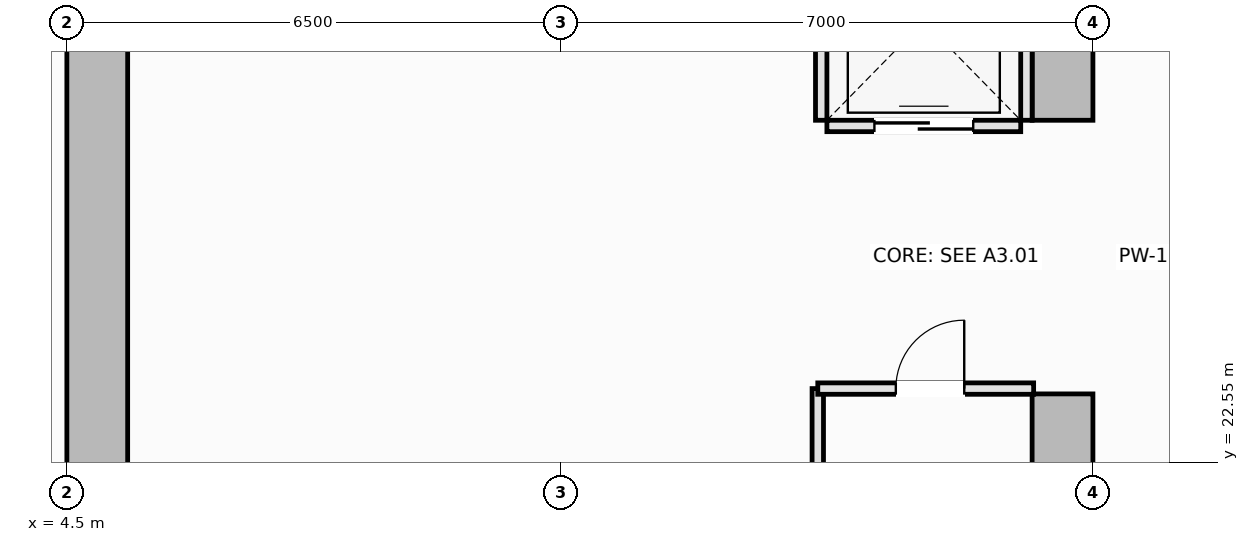
"""IFC4 building model, lengths in metres.
Left out: names, types, materials, properties, quantities, classifications, styles, units other than length and angle.
Written with IfcOpenShell. Run it as: python <this file> out.ifc"""

import sys

from ifc_helpers import new_model, si_unit, direction, frame, frame_2d, origin, place, context, subcontext, project, spatial, rectangle, extrude, element, fill, save


model = new_model("IFC4")
c1 = context("Model", 3, precision=1e-05, world=origin(), true_north=direction((0.0, 1.0)))
c2 = subcontext(c1, "Body", "Model", "MODEL_VIEW")
j1 = project(units=[si_unit("LENGTHUNIT", "METRE"), si_unit("PLANEANGLEUNIT", "RADIAN")], contexts=[c1])
p1 = place(None, origin())
s1 = spatial("IfcSite", under=j1, at=p1, CompositionType="ELEMENT")
p2 = place(p1, origin())
s2 = spatial("IfcBuilding", under=s1, at=p2, CompositionType="ELEMENT")
p3 = place(p2, frame((0.0, 0.0, -13.2)))
s3 = spatial("IfcBuildingStorey", under=s2, at=p3, CompositionType="ELEMENT", Elevation=-13.2)
p4 = place(p3, frame((4.9, 14.8, 0.0), z_axis=(0.0, 0.0, 1.0), x_axis=(0.0, 1.0, 0.0)))
e1 = element("IfcWall", 1, at=p4, inside=s3, PredefinedType="SHEAR", context=c2, shape_type="SweptSolid", body=[
    extrude(rectangle(XDim=20.9, YDim=0.8, at=frame_2d((10.45, 0.0))), origin(), (0.0, 0.0, 1.0), 4.2),
])
p5 = place(p3, frame((17.6, 14.8, 0.0), z_axis=(0.0, 0.0, 1.0), x_axis=(0.0, 1.0, 0.0)))
e2 = element("IfcWall", 2, at=p5, inside=s3, PredefinedType="SHEAR", context=c2, shape_type="SweptSolid", body=[
    extrude(rectangle(XDim=8.65, YDim=0.8, at=frame_2d((4.325, 0.0))), origin(), (0.0, 0.0, 1.0), 4.2),
])
p6 = place(p5, frame((4.1, 0.0, 0.0)))
e3 = element("IfcOpeningElement", 3, at=p6, cuts=e2, PredefinedType="OPENING", context=c2, shape_type="SweptSolid", body=[
    extrude(rectangle(XDim=1.1, YDim=2.15, at=frame_2d((0.55, 1.075))), frame((0.0, 0.41, 0.0), z_axis=(0.0, -1.0, 0.0), x_axis=(1.0, 0.0, 0.0)), (0.0, 0.0, 1.0), 0.82),
])
p7 = place(p3, frame((17.6, 27.05, 0.0), z_axis=(0.0, 0.0, 1.0), x_axis=(0.0, 1.0, 0.0)))
e4 = element("IfcWall", 4, at=p7, inside=s3, PredefinedType="SHEAR", context=c2, shape_type="SweptSolid", body=[
    extrude(rectangle(XDim=8.65, YDim=0.8, at=frame_2d((4.325, 0.0))), origin(), (0.0, 0.0, 1.0), 4.2),
])
p8 = place(p7, frame((3.45, 0.0, 0.0)))
e5 = element("IfcOpeningElement", 5, at=p8, cuts=e4, PredefinedType="OPENING", context=c2, shape_type="SweptSolid", body=[
    extrude(rectangle(XDim=1.1, YDim=2.15, at=frame_2d((0.55, 1.075))), frame((0.0, 0.41, 0.0), z_axis=(0.0, -1.0, 0.0), x_axis=(1.0, 0.0, 0.0)), (0.0, 0.0, 1.0), 0.82),
])
p9 = place(p3, frame((14.5, 26.975, 0.0), z_axis=(0.0, 0.0, 1.0), x_axis=(1.0, 0.0, 0.0)))
e6 = element("IfcWall", 6, at=p9, inside=s3, PredefinedType="PARTITIONING", context=c2, shape_type="SweptSolid", body=[
    extrude(rectangle(XDim=2.55, YDim=0.15, at=frame_2d((1.275, 0.0))), origin(), (0.0, 0.0, 1.0), 4.0),
])
p10 = place(p9, frame((0.625, 0.0, 0.0)))
e7 = element("IfcOpeningElement", 7, at=p10, cuts=e6, PredefinedType="OPENING", context=c2, shape_type="SweptSolid", body=[
    extrude(rectangle(XDim=1.3, YDim=2.2, at=frame_2d((0.65, 1.1))), frame((0.0, 0.085, 0.0), z_axis=(0.0, -1.0, 0.0), x_axis=(1.0, 0.0, 0.0)), (0.0, 0.0, 1.0), 0.17),
])
for number, where, z_axis, x_axis in (
    (8, (14.425, 27.05, 0.0), (0.0, 0.0, 1.0), (0.0, 1.0, 0.0)),
    (9, (17.125, 27.05, 0.0), (0.0, 0.0, 1.0), (0.0, 1.0, 0.0)),
):
    element("IfcWall", number, at=place(p3, frame(where, z_axis=z_axis, x_axis=x_axis)), inside=s3, PredefinedType="PARTITIONING", context=c2, shape_type="SweptSolid", body=[
        extrude(rectangle(XDim=2.6, YDim=0.15, at=frame_2d((1.3, 0.0))), origin(), (0.0, 0.0, 1.0), 4.0),
    ])
p11 = place(p3, frame((14.38, 20.85, 0.0), z_axis=(0.0, 0.0, 1.0), x_axis=(0.0, 1.0, 0.0)))
e10 = element("IfcWall", 10, at=p11, inside=s3, PredefinedType="PARTITIONING", context=c2, shape_type="SweptSolid", body=[
    extrude(rectangle(XDim=2.67, YDim=0.15, at=frame_2d((1.335, 0.0))), origin(), (0.0, 0.0, 1.0), 4.0),
])
p12 = place(p3, frame((14.38, 23.52, 0.0), z_axis=(0.0, 0.0, 1.0), x_axis=(1.0, 0.0, 0.0)))
e11 = element("IfcWall", 11, at=p12, inside=s3, PredefinedType="PARTITIONING", context=c2, shape_type="SweptSolid", body=[
    extrude(rectangle(XDim=2.84, YDim=0.15, at=frame_2d((1.42, 0.0))), origin(), (0.0, 0.0, 1.0), 4.0),
])
p13 = place(p12, frame((1.027, 0.0, 0.0)))
e12 = element("IfcOpeningElement", 12, at=p13, cuts=e11, PredefinedType="OPENING", context=c2, shape_type="SweptSolid", body=[
    extrude(rectangle(XDim=0.9, YDim=2.1, at=frame_2d((0.45, 1.05))), frame((0.0, 0.085, 0.0), z_axis=(0.0, -1.0, 0.0), x_axis=(1.0, 0.0, 0.0)), (0.0, 0.0, 1.0), 0.17),
])
p14 = place(p10, origin())
e13 = element("IfcDoor", 13, at=p14, inside=s3, OperationType="DOUBLE_DOOR_SLIDING", PredefinedType="DOOR", context=c2, shape_type="SweptSolid", body=[
    extrude(rectangle(XDim=1.3, YDim=2.2, at=frame_2d((0.65, 1.1))), frame((0.0, 0.025, 0.0), z_axis=(0.0, -1.0, 0.0), x_axis=(1.0, 0.0, 0.0)), (0.0, 0.0, 1.0), 0.05),
])
fill(e7, e13)
p15 = place(p13, origin())
e14 = element("IfcDoor", 14, at=p15, inside=s3, OperationType="SINGLE_SWING_RIGHT", PredefinedType="DOOR", context=c2, shape_type="SweptSolid", body=[
    extrude(rectangle(XDim=0.9, YDim=2.1, at=frame_2d((0.45, 1.05))), frame((0.0, 0.025, 0.0), z_axis=(0.0, -1.0, 0.0), x_axis=(1.0, 0.0, 0.0)), (0.0, 0.0, 1.0), 0.05),
])
fill(e12, e14)
save(model, sys.argv[1])
